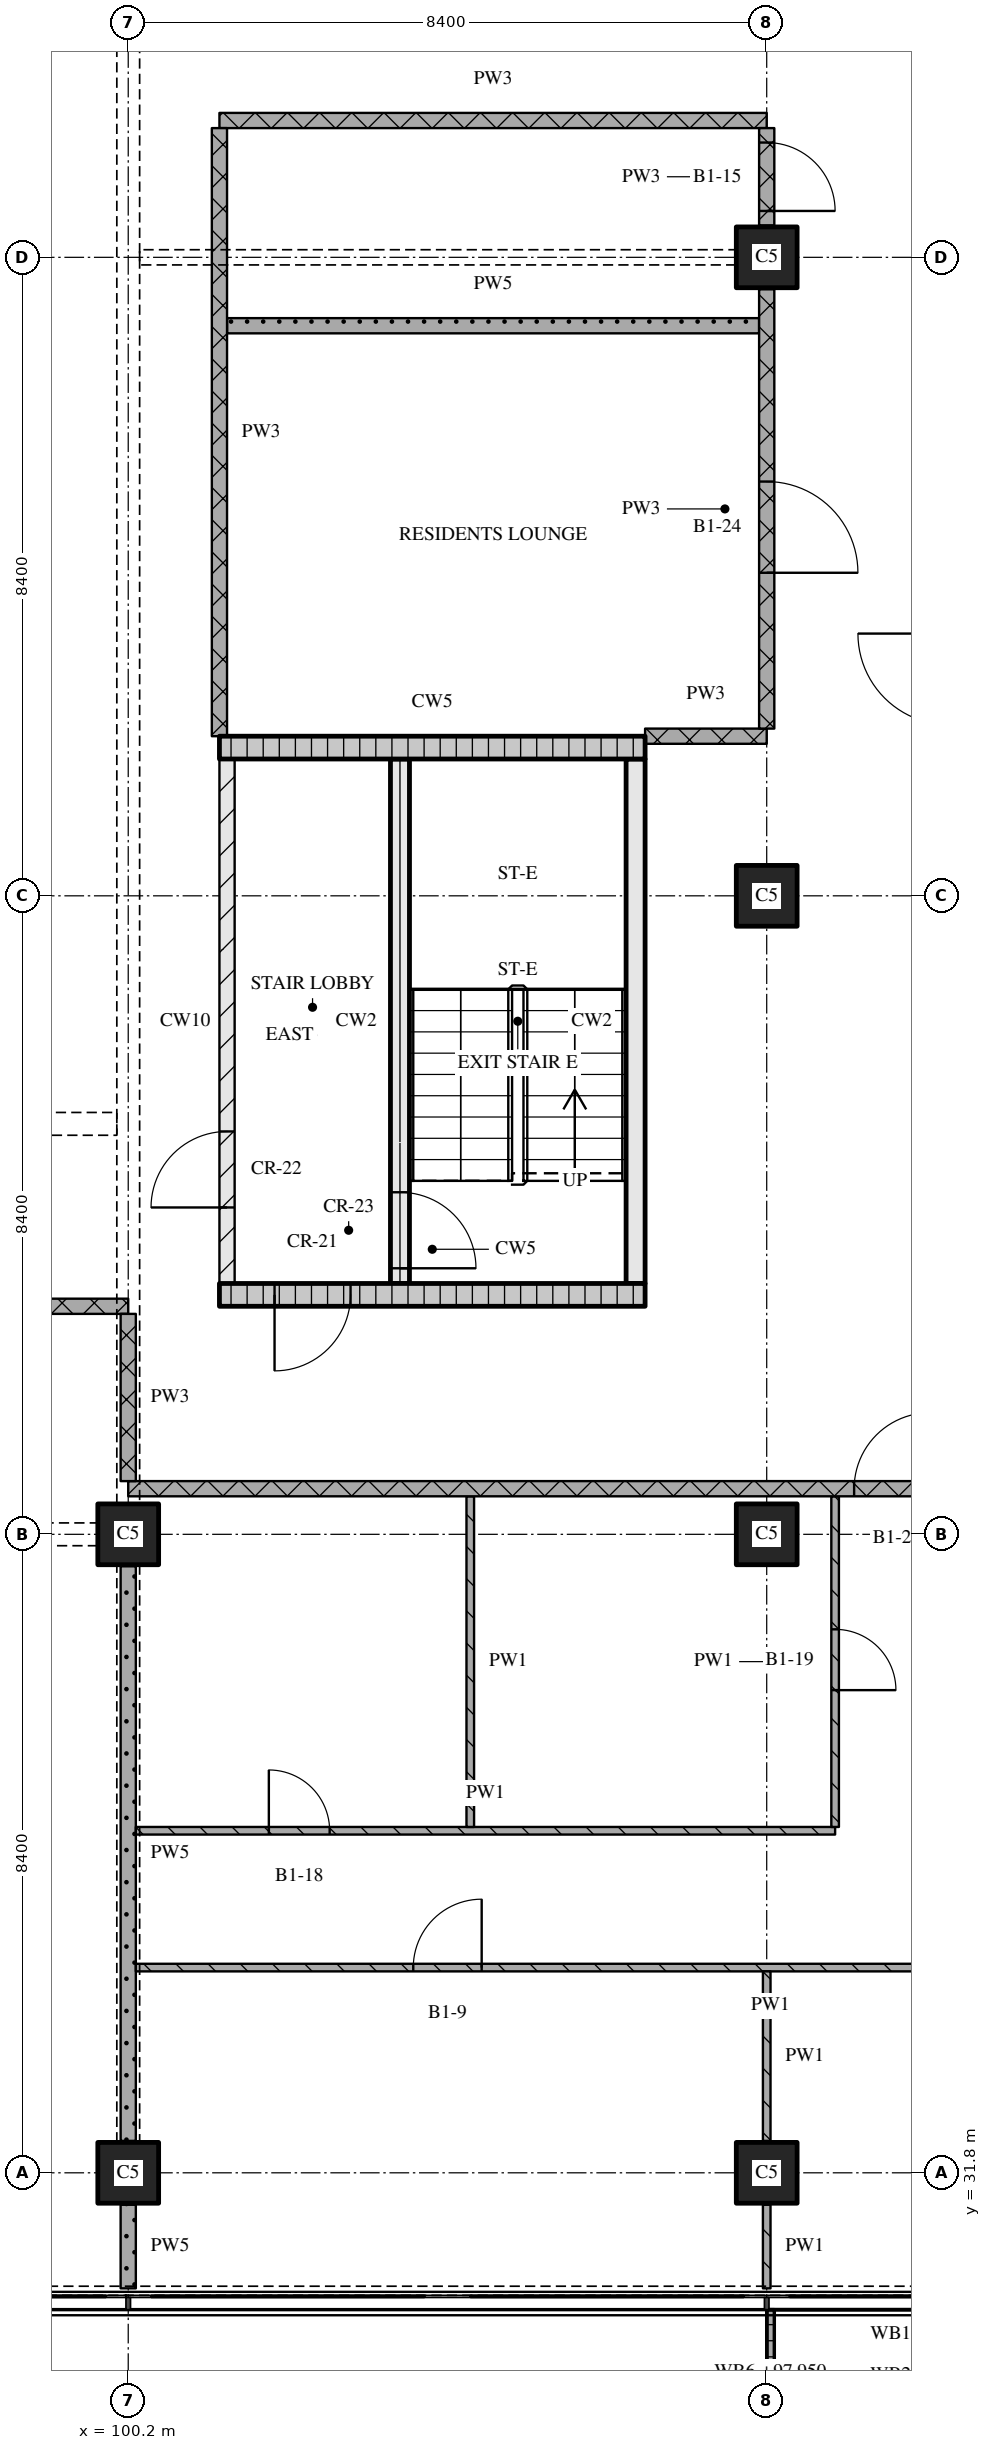
"""IFC4 building model, lengths in metres.
Left out: names, types, materials, properties, quantities, classifications, styles, units other than length and angle.
Written with IfcOpenShell. Run it as: python <this file> out.ifc"""

import sys

from ifc_helpers import new_model, si_unit, direction, frame, frame_2d, origin, origin_2d, place, context, subcontext, project, spatial, polyline, rectangle, outline, extrude, element, fill, save


model = new_model("IFC4")
c1 = context("Model", 3, precision=1e-05, world=origin(), true_north=direction((0.0, 1.0)))
c2 = subcontext(c1, "Body", "Model", "MODEL_VIEW")
j1 = project(units=[si_unit("LENGTHUNIT", "METRE"), si_unit("PLANEANGLEUNIT", "RADIAN")], contexts=[c1])
p1 = place(None, origin())
s1 = spatial("IfcSite", under=j1, at=p1, CompositionType="ELEMENT")
p2 = place(p1, origin())
s2 = spatial("IfcBuilding", under=s1, at=p2, CompositionType="ELEMENT")
p3 = place(p2, frame((0.0, 0.0, 95.25)))
s3 = spatial("IfcBuildingStorey", under=s2, at=p3, CompositionType="ELEMENT", Elevation=95.25)
for number, where, z_axis, x_axis in (
    (1, (100.2, 31.8, 0.0), (0.0, 0.0, 1.0), (1.0, 0.0, 0.0)),
    (2, (100.2, 40.2, 0.0), (0.0, 0.0, 1.0), (1.0, 0.0, 0.0)),
    (3, (108.6, 31.8, 0.0), (0.0, 0.0, 1.0), (1.0, 0.0, 0.0)),
    (4, (108.6, 40.2, 0.0), (0.0, 0.0, 1.0), (1.0, 0.0, 0.0)),
    (5, (108.6, 48.6, 0.0), (0.0, 0.0, 1.0), (1.0, 0.0, 0.0)),
    (6, (108.6, 57.0, 0.0), (0.0, 0.0, 1.0), (1.0, 0.0, 0.0)),
):
    element("IfcColumn", number, at=place(p3, frame(where, z_axis=z_axis, x_axis=x_axis)), inside=s3, PredefinedType="COLUMN", context=c2, shape_type="SweptSolid", body=[
        extrude(rectangle(XDim=0.8, YDim=0.8, at=origin_2d()), origin(), (0.0, 0.0, 1.0), 3.6),
    ])
p4 = place(p3, origin())
e7 = element("IfcWall", 7, at=p4, inside=s3, PredefinedType="SOLIDWALL", context=c2, shape_type="SweptSolid", body=[
    extrude(outline(polyline([(108.6, 30.0), (108.7, 30.0), (108.7, 28.367), (112.7, 28.367), (112.7, 30.0), (112.8, 30.0), (112.8, 28.267), (108.6, 28.267), (108.6, 30.0)])), origin(), (0.0, 0.0, 1.0), 1.0),
])
p5 = place(p3, frame((101.4, 43.35, 0.0), z_axis=(0.0, 0.0, 1.0), x_axis=(1.0, 0.0, 0.0)))
e8 = element("IfcWall", 8, at=p5, inside=s3, PredefinedType="SOLIDWALL", context=c2, shape_type="SweptSolid", body=[
    extrude(rectangle(XDim=5.6, YDim=0.3, at=frame_2d((2.8, 0.0))), origin(), (0.0, 0.0, 1.0), 3.32),
])
p6 = place(p5, frame((0.725, 0.0, 0.0)))
e9 = element("IfcOpeningElement", 9, at=p6, cuts=e8, PredefinedType="OPENING", context=c2, shape_type="SweptSolid", body=[
    extrude(rectangle(XDim=1.0, YDim=2.1, at=frame_2d((0.5, 1.05))), frame((0.0, 0.16, 0.0), z_axis=(0.0, -1.0, 0.0), x_axis=(1.0, 0.0, 0.0)), (0.0, 0.0, 1.0), 0.32),
])
p7 = place(p3, frame((101.5, 43.5, 0.0), z_axis=(0.0, 0.0, 1.0), x_axis=(0.0, 1.0, 0.0)))
e10 = element("IfcWall", 10, at=p7, inside=s3, PredefinedType="PARTITIONING", context=c2, shape_type="SweptSolid", body=[
    extrude(rectangle(XDim=6.9, YDim=0.2, at=frame_2d((3.45, 0.0))), origin(), (0.0, 0.0, 1.0), 3.32),
])
p8 = place(p7, frame((1.0, 0.0, 0.0)))
e11 = element("IfcOpeningElement", 11, at=p8, cuts=e10, PredefinedType="OPENING", context=c2, shape_type="SweptSolid", body=[
    extrude(rectangle(XDim=1.0, YDim=2.1, at=frame_2d((0.5, 1.05))), frame((0.0, 0.11, 0.0), z_axis=(0.0, -1.0, 0.0), x_axis=(1.0, 0.0, 0.0)), (0.0, 0.0, 1.0), 0.22),
])
p9 = place(p3, frame((103.775, 43.5, 0.0), z_axis=(0.0, 0.0, 1.0), x_axis=(0.0, 1.0, 0.0)))
e12 = element("IfcWall", 12, at=p9, inside=s3, PredefinedType="SOLIDWALL", context=c2, shape_type="SweptSolid", body=[
    extrude(rectangle(XDim=6.9, YDim=0.25, at=frame_2d((3.45, 0.0))), origin(), (0.0, 0.0, 1.0), 3.32),
])
p10 = place(p9, frame((0.2, 0.0, 0.0)))
e13 = element("IfcOpeningElement", 13, at=p10, cuts=e12, PredefinedType="OPENING", context=c2, shape_type="SweptSolid", body=[
    extrude(rectangle(XDim=1.0, YDim=2.1, at=frame_2d((0.5, 1.05))), frame((0.0, 0.135, 0.0), z_axis=(0.0, -1.0, 0.0), x_axis=(1.0, 0.0, 0.0)), (0.0, 0.0, 1.0), 0.27),
])
p11 = place(p3, frame((106.875, 43.5, 0.0), z_axis=(0.0, 0.0, 1.0), x_axis=(0.0, 1.0, 0.0)))
e14 = element("IfcWall", 14, at=p11, inside=s3, PredefinedType="SOLIDWALL", context=c2, shape_type="SweptSolid", body=[
    extrude(rectangle(XDim=6.9, YDim=0.25, at=frame_2d((3.45, 0.0))), origin(), (0.0, 0.0, 1.0), 3.32),
])
p12 = place(p3, frame((101.4, 50.55, 0.0), z_axis=(0.0, 0.0, 1.0), x_axis=(1.0, 0.0, 0.0)))
e15 = element("IfcWall", 15, at=p12, inside=s3, PredefinedType="SOLIDWALL", context=c2, shape_type="SweptSolid", body=[
    extrude(rectangle(XDim=5.6, YDim=0.3, at=frame_2d((2.8, 0.0))), origin(), (0.0, 0.0, 1.0), 3.32),
])
p13 = place(p3, frame((117.0, 34.5, 0.0), z_axis=(0.0, 0.0, 1.0), x_axis=(-1.0, 0.0, 0.0)))
e16 = element("IfcWall", 16, at=p13, inside=s3, PredefinedType="PARTITIONING", context=c2, shape_type="SweptSolid", body=[
    extrude(rectangle(XDim=16.7, YDim=0.1, at=frame_2d((8.35, 0.0))), origin(), (0.0, 0.0, 1.0), 3.32),
])
p14 = place(p13, frame((12.15, 0.0, 0.0)))
e17 = element("IfcOpeningElement", 17, at=p14, cuts=e16, PredefinedType="OPENING", context=c2, shape_type="SweptSolid", body=[
    extrude(rectangle(XDim=0.9, YDim=2.1, at=frame_2d((0.45, 1.05))), frame((0.0, 0.06, 0.0), z_axis=(0.0, -1.0, 0.0), x_axis=(1.0, 0.0, 0.0)), (0.0, 0.0, 1.0), 0.12),
])
p15 = place(p3, frame((100.3, 36.3, 0.0), z_axis=(0.0, 0.0, 1.0), x_axis=(1.0, 0.0, 0.0)))
e18 = element("IfcWall", 18, at=p15, inside=s3, PredefinedType="PARTITIONING", context=c2, shape_type="SweptSolid", body=[
    extrude(rectangle(XDim=9.2, YDim=0.1, at=frame_2d((4.6, 0.0))), origin(), (0.0, 0.0, 1.0), 3.32),
])
p16 = place(p15, frame((1.75, 0.0, 0.0)))
e19 = element("IfcOpeningElement", 19, at=p16, cuts=e18, PredefinedType="OPENING", context=c2, shape_type="SweptSolid", body=[
    extrude(rectangle(XDim=0.8, YDim=2.1, at=frame_2d((0.4, 1.05))), frame((0.0, 0.06, 0.0), z_axis=(0.0, -1.0, 0.0), x_axis=(1.0, 0.0, 0.0)), (0.0, 0.0, 1.0), 0.12),
])
p17 = place(p3, frame((124.38, 40.8, 0.0), z_axis=(0.0, 0.0, 1.0), x_axis=(-1.0, 0.0, 0.0)))
e20 = element("IfcWall", 20, at=p17, inside=s3, PredefinedType="PARTITIONING", context=c2, shape_type="SweptSolid", body=[
    extrude(rectangle(XDim=24.18, YDim=0.2, at=frame_2d((12.09, 0.0))), origin(), (0.0, 0.0, 1.0), 3.32),
])
p18 = place(p17, frame((13.63, 0.0, 0.0)))
e21 = element("IfcOpeningElement", 21, at=p18, cuts=e20, PredefinedType="OPENING", context=c2, shape_type="SweptSolid", body=[
    extrude(rectangle(XDim=1.0, YDim=2.1, at=frame_2d((0.5, 1.05))), frame((0.0, 0.11, 0.0), z_axis=(0.0, -1.0, 0.0), x_axis=(1.0, 0.0, 0.0)), (0.0, 0.0, 1.0), 0.22),
])
p19 = place(p3, frame((100.2, 43.2, 0.0), z_axis=(0.0, 0.0, 1.0), x_axis=(-1.0, 0.0, 0.0)))
e22 = element("IfcWall", 22, at=p19, inside=s3, PredefinedType="PARTITIONING", context=c2, shape_type="SweptSolid", body=[
    extrude(rectangle(XDim=25.2, YDim=0.2, at=frame_2d((12.6, 0.0))), origin(), (0.0, 0.0, 1.0), 3.32),
])
p20 = place(p19, frame((7.8, 0.0, 0.0)))
e23 = element("IfcOpeningElement", 23, at=p20, cuts=e22, PredefinedType="OPENING", context=c2, shape_type="SweptSolid", body=[
    extrude(rectangle(XDim=1.2, YDim=2.1, at=frame_2d((0.6, 1.05))), frame((0.0, 0.11, 0.0), z_axis=(0.0, -1.0, 0.0), x_axis=(1.0, 0.0, 0.0)), (0.0, 0.0, 1.0), 0.22),
])
p21 = place(p19, frame((20.4, 0.0, 0.0)))
e24 = element("IfcOpeningElement", 24, at=p21, cuts=e22, PredefinedType="OPENING", context=c2, shape_type="SweptSolid", body=[
    extrude(rectangle(XDim=1.2, YDim=2.1, at=frame_2d((0.6, 1.05))), frame((0.0, 0.11, 0.0), z_axis=(0.0, -1.0, 0.0), x_axis=(1.0, 0.0, 0.0)), (0.0, 0.0, 1.0), 0.22),
])
p22 = place(p3, frame((107.0, 50.7, 0.0), z_axis=(0.0, 0.0, 1.0), x_axis=(1.0, 0.0, 0.0)))
e25 = element("IfcWall", 25, at=p22, inside=s3, PredefinedType="PARTITIONING", context=c2, shape_type="SweptSolid", body=[
    extrude(rectangle(XDim=1.6, YDim=0.2, at=frame_2d((0.8, 0.0))), origin(), (0.0, 0.0, 1.0), 3.32),
])
p23 = place(p3, frame((101.5, 56.1, 0.0), z_axis=(0.0, 0.0, 1.0), x_axis=(1.0, 0.0, 0.0)))
e26 = element("IfcWall", 26, at=p23, inside=s3, PredefinedType="PARTITIONING", context=c2, shape_type="SweptSolid", body=[
    extrude(rectangle(XDim=7.0, YDim=0.2, at=frame_2d((3.5, 0.0))), origin(), (0.0, 0.0, 1.0), 3.32),
])
p24 = place(p3, frame((101.4, 58.8, 0.0), z_axis=(0.0, 0.0, 1.0), x_axis=(1.0, 0.0, 0.0)))
e27 = element("IfcWall", 27, at=p24, inside=s3, PredefinedType="PARTITIONING", context=c2, shape_type="SweptSolid", body=[
    extrude(rectangle(XDim=7.2, YDim=0.2, at=frame_2d((3.6, 0.0))), origin(), (0.0, 0.0, 1.0), 3.32),
])
p25 = place(p3, frame((100.2, 43.1, 0.0), z_axis=(0.0, 0.0, 1.0), x_axis=(0.0, -1.0, 0.0)))
e28 = element("IfcWall", 28, at=p25, inside=s3, PredefinedType="PARTITIONING", context=c2, shape_type="SweptSolid", body=[
    extrude(rectangle(XDim=2.2, YDim=0.2, at=frame_2d((1.1, 0.0))), origin(), (0.0, 0.0, 1.0), 2.43),
])
p26 = place(p3, frame((100.2, 31.38, 0.0), z_axis=(0.0, 0.0, 1.0), x_axis=(0.0, -1.0, 0.0)))
e29 = element("IfcWall", 29, at=p26, inside=s3, PredefinedType="PARTITIONING", context=c2, shape_type="SweptSolid", body=[
    extrude(rectangle(XDim=1.1, YDim=0.2, at=frame_2d((0.55, 0.0))), origin(), (0.0, 0.0, 1.0), 3.32),
])
p27 = place(p3, frame((100.2, 39.78, 0.0), z_axis=(0.0, 0.0, 1.0), x_axis=(0.0, -1.0, 0.0)))
e30 = element("IfcWall", 30, at=p27, inside=s3, PredefinedType="PARTITIONING", context=c2, shape_type="SweptSolid", body=[
    extrude(rectangle(XDim=7.56, YDim=0.2, at=frame_2d((3.78, 0.0))), origin(), (0.0, 0.0, 1.0), 2.83),
])
p28 = place(p3, frame((101.4, 58.7, 0.0), z_axis=(0.0, 0.0, 1.0), x_axis=(0.0, -1.0, 0.0)))
e31 = element("IfcWall", 31, at=p28, inside=s3, PredefinedType="PARTITIONING", context=c2, shape_type="SweptSolid", body=[
    extrude(rectangle(XDim=8.0, YDim=0.2, at=frame_2d((4.0, 0.0))), origin(), (0.0, 0.0, 1.0), 3.32),
])
p29 = place(p3, frame((104.7, 40.7, 0.0), z_axis=(0.0, 0.0, 1.0), x_axis=(0.0, -1.0, 0.0)))
e32 = element("IfcWall", 32, at=p29, inside=s3, PredefinedType="PARTITIONING", context=c2, shape_type="SweptSolid", body=[
    extrude(rectangle(XDim=4.35, YDim=0.1, at=frame_2d((2.175, 0.0))), origin(), (0.0, 0.0, 1.0), 3.32),
])
p30 = place(p3, frame((108.6, 50.8, 0.0), z_axis=(0.0, 0.0, 1.0), x_axis=(0.0, 1.0, 0.0)))
e33 = element("IfcWall", 33, at=p30, inside=s3, PredefinedType="PARTITIONING", context=c2, shape_type="SweptSolid", body=[
    extrude(rectangle(XDim=5.78, YDim=0.2, at=frame_2d((2.89, 0.0))), origin(), (0.0, 0.0, 1.0), 3.32),
])
p31 = place(p30, frame((2.05, 0.0, 0.0)))
e34 = element("IfcOpeningElement", 34, at=p31, cuts=e33, PredefinedType="OPENING", context=c2, shape_type="SweptSolid", body=[
    extrude(rectangle(XDim=1.2, YDim=2.1, at=frame_2d((0.6, 1.05))), frame((0.0, 0.11, 0.0), z_axis=(0.0, -1.0, 0.0), x_axis=(1.0, 0.0, 0.0)), (0.0, 0.0, 1.0), 0.22),
])
p32 = place(p3, frame((108.6, 57.42, 0.0), z_axis=(0.0, 0.0, 1.0), x_axis=(0.0, 1.0, 0.0)))
e35 = element("IfcWall", 35, at=p32, inside=s3, PredefinedType="PARTITIONING", context=c2, shape_type="SweptSolid", body=[
    extrude(rectangle(XDim=1.28, YDim=0.2, at=frame_2d((0.64, 0.0))), origin(), (0.0, 0.0, 1.0), 3.32),
])
p33 = place(p32, frame((0.19, 0.0, 0.0)))
e36 = element("IfcOpeningElement", 36, at=p33, cuts=e35, PredefinedType="OPENING", context=c2, shape_type="SweptSolid", body=[
    extrude(rectangle(XDim=0.9, YDim=2.1, at=frame_2d((0.45, 1.05))), frame((0.0, 0.11, 0.0), z_axis=(0.0, -1.0, 0.0), x_axis=(1.0, 0.0, 0.0)), (0.0, 0.0, 1.0), 0.22),
])
p34 = place(p3, frame((108.6, 31.38, 0.0), z_axis=(0.0, 0.0, 1.0), x_axis=(0.0, -1.0, 0.0)))
e37 = element("IfcWall", 37, at=p34, inside=s3, PredefinedType="PARTITIONING", context=c2, shape_type="SweptSolid", body=[
    extrude(rectangle(XDim=1.1, YDim=0.1, at=frame_2d((0.55, 0.0))), origin(), (0.0, 0.0, 1.0), 3.32),
])
p35 = place(p3, frame((108.6, 34.45, 0.0), z_axis=(0.0, 0.0, 1.0), x_axis=(0.0, -1.0, 0.0)))
e38 = element("IfcWall", 38, at=p35, inside=s3, PredefinedType="PARTITIONING", context=c2, shape_type="SweptSolid", body=[
    extrude(rectangle(XDim=2.23, YDim=0.1, at=frame_2d((1.115, 0.0))), origin(), (0.0, 0.0, 1.0), 3.32),
])
p36 = place(p3, frame((109.5, 36.35, 0.0), z_axis=(0.0, 0.0, 1.0), x_axis=(0.0, 1.0, 0.0)))
e39 = element("IfcWall", 39, at=p36, inside=s3, PredefinedType="PARTITIONING", context=c2, shape_type="SweptSolid", body=[
    extrude(rectangle(XDim=4.35, YDim=0.1, at=frame_2d((2.175, 0.0))), origin(), (0.0, 0.0, 1.0), 3.32),
])
p37 = place(p36, frame((1.8, 0.0, 0.0)))
e40 = element("IfcOpeningElement", 40, at=p37, cuts=e39, PredefinedType="OPENING", context=c2, shape_type="SweptSolid", body=[
    extrude(rectangle(XDim=0.8, YDim=2.1, at=frame_2d((0.4, 1.05))), frame((0.0, 0.06, 0.0), z_axis=(0.0, -1.0, 0.0), x_axis=(1.0, 0.0, 0.0)), (0.0, 0.0, 1.0), 0.12),
])
p38 = place(p6, origin())
e41 = element("IfcDoor", 41, at=p38, inside=s3, OperationType="SINGLE_SWING_RIGHT", PredefinedType="DOOR", context=c2, shape_type="SweptSolid", body=[
    extrude(rectangle(XDim=1.0, YDim=2.1, at=frame_2d((0.5, 1.05))), frame((0.0, 0.025, 0.0), z_axis=(0.0, -1.0, 0.0), x_axis=(1.0, 0.0, 0.0)), (0.0, 0.0, 1.0), 0.05),
])
fill(e9, e41)
p39 = place(p10, origin())
e42 = element("IfcDoor", 42, at=p39, inside=s3, OperationType="SINGLE_SWING_RIGHT", PredefinedType="DOOR", context=c2, shape_type="SweptSolid", body=[
    extrude(rectangle(XDim=1.0, YDim=2.1, at=frame_2d((0.5, 1.05))), frame((0.0, 0.025, 0.0), z_axis=(0.0, -1.0, 0.0), x_axis=(1.0, 0.0, 0.0)), (0.0, 0.0, 1.0), 0.05),
])
fill(e13, e42)
p40 = place(p8, origin())
e43 = element("IfcDoor", 43, at=p40, inside=s3, OperationType="SINGLE_SWING_LEFT", PredefinedType="DOOR", context=c2, shape_type="SweptSolid", body=[
    extrude(rectangle(XDim=1.0, YDim=2.1, at=frame_2d((0.5, 1.05))), frame((0.0, 0.025, 0.0), z_axis=(0.0, -1.0, 0.0), x_axis=(1.0, 0.0, 0.0)), (0.0, 0.0, 1.0), 0.05),
])
fill(e11, e43)
p41 = place(p14, origin())
e44 = element("IfcDoor", 44, at=p41, inside=s3, OperationType="SINGLE_SWING_RIGHT", PredefinedType="DOOR", context=c2, shape_type="SweptSolid", body=[
    extrude(rectangle(XDim=0.9, YDim=2.1, at=frame_2d((0.45, 1.05))), frame((0.0, 0.025, 0.0), z_axis=(0.0, -1.0, 0.0), x_axis=(1.0, 0.0, 0.0)), (0.0, 0.0, 1.0), 0.05),
])
fill(e17, e44)
p42 = place(p16, origin())
e45 = element("IfcDoor", 45, at=p42, inside=s3, OperationType="SINGLE_SWING_LEFT", PredefinedType="DOOR", context=c2, shape_type="SweptSolid", body=[
    extrude(rectangle(XDim=0.8, YDim=2.1, at=frame_2d((0.4, 1.05))), frame((0.0, 0.025, 0.0), z_axis=(0.0, -1.0, 0.0), x_axis=(1.0, 0.0, 0.0)), (0.0, 0.0, 1.0), 0.05),
])
fill(e19, e45)
p43 = place(p18, origin())
e46 = element("IfcDoor", 46, at=p43, inside=s3, OperationType="SINGLE_SWING_RIGHT", PredefinedType="DOOR", context=c2, shape_type="SweptSolid", body=[
    extrude(rectangle(XDim=1.0, YDim=2.1, at=frame_2d((0.5, 1.05))), frame((0.0, 0.025, 0.0), z_axis=(0.0, -1.0, 0.0), x_axis=(1.0, 0.0, 0.0)), (0.0, 0.0, 1.0), 0.05),
])
fill(e21, e46)
p44 = place(p31, origin())
e47 = element("IfcDoor", 47, at=p44, inside=s3, OperationType="SINGLE_SWING_RIGHT", PredefinedType="DOOR", context=c2, shape_type="SweptSolid", body=[
    extrude(rectangle(XDim=1.2, YDim=2.1, at=frame_2d((0.6, 1.05))), frame((0.0, 0.025, 0.0), z_axis=(0.0, -1.0, 0.0), x_axis=(1.0, 0.0, 0.0)), (0.0, 0.0, 1.0), 0.05),
])
fill(e34, e47)
p45 = place(p33, origin())
e48 = element("IfcDoor", 48, at=p45, inside=s3, OperationType="SINGLE_SWING_RIGHT", PredefinedType="DOOR", context=c2, shape_type="SweptSolid", body=[
    extrude(rectangle(XDim=0.9, YDim=2.1, at=frame_2d((0.45, 1.05))), frame((0.0, 0.025, 0.0), z_axis=(0.0, -1.0, 0.0), x_axis=(1.0, 0.0, 0.0)), (0.0, 0.0, 1.0), 0.05),
])
fill(e36, e48)
p46 = place(p37, origin())
e49 = element("IfcDoor", 49, at=p46, inside=s3, OperationType="SINGLE_SWING_RIGHT", PredefinedType="DOOR", context=c2, shape_type="SweptSolid", body=[
    extrude(rectangle(XDim=0.8, YDim=2.1, at=frame_2d((0.4, 1.05))), frame((0.0, 0.025, 0.0), z_axis=(0.0, -1.0, 0.0), x_axis=(1.0, 0.0, 0.0)), (0.0, 0.0, 1.0), 0.05),
])
fill(e40, e49)
save(model, sys.argv[1])
